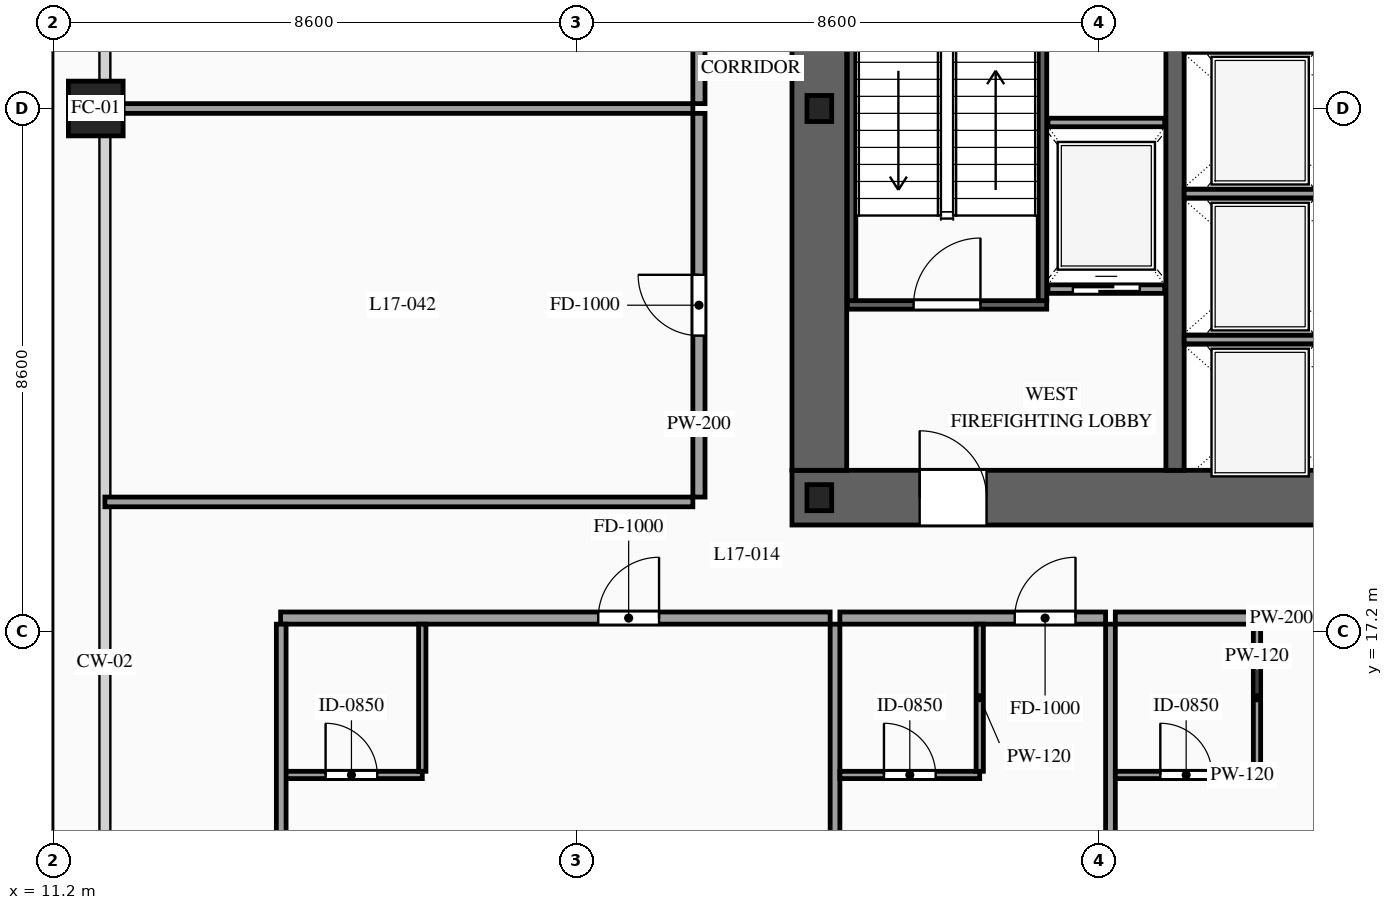
"""IFC4 building model, lengths in metres.
Left out: names, types, materials, properties, quantities, classifications, styles, units other than length and angle.
Written with IfcOpenShell. Run it as: python <this file> out.ifc"""

import sys

from ifc_helpers import new_model, si_unit, direction, frame, frame_2d, origin, origin_2d, place, context, subcontext, project, spatial, rectangle, hollow_rectangle, i_section, extrude, source, transform, mapped, element, fill, save


model = new_model("IFC4")
c1 = context("Model", 3, precision=1e-05, world=origin(), true_north=direction((0.0, 1.0)))
c2 = subcontext(c1, "Body", "Model", "MODEL_VIEW")
j1 = project(units=[si_unit("LENGTHUNIT", "METRE"), si_unit("PLANEANGLEUNIT", "RADIAN")], contexts=[c1])
p1 = place(None, origin())
s1 = spatial("IfcSite", under=j1, at=p1, CompositionType="ELEMENT")
p2 = place(p1, origin())
s2 = spatial("IfcBuilding", under=s1, at=p2, CompositionType="ELEMENT")
p3 = place(p2, frame((0.0, 0.0, 67.6)))
s3 = spatial("IfcBuildingStorey", under=s2, at=p3, CompositionType="ELEMENT", Elevation=67.6)
p4 = place(p3, frame((23.35, 19.4, 0.0), z_axis=(0.0, 0.0, 1.0), x_axis=(1.0, 0.0, 0.0)))
e1 = element("IfcWall", 1, at=p4, inside=s3, PredefinedType="SHEAR", context=c2, shape_type="SweptSolid", body=[
    extrude(rectangle(XDim=27.3, YDim=0.9, at=frame_2d((13.65, 0.0))), origin(), (0.0, 0.0, 1.0), 3.6),
])
p5 = place(p4, frame((2.1, 0.0, 0.0)))
e2 = element("IfcOpeningElement", 2, at=p5, cuts=e1, PredefinedType="OPENING", context=c2, shape_type="SweptSolid", body=[
    extrude(rectangle(XDim=1.1, YDim=2.2, at=frame_2d((0.55, 1.1))), frame((0.0, 0.465, 0.0), z_axis=(0.0, -1.0, 0.0), x_axis=(1.0, 0.0, 0.0)), (0.0, 0.0, 1.0), 0.93),
])
p6 = place(p4, frame((10.0, 0.0, 0.0)))
e3 = element("IfcOpeningElement", 3, at=p6, cuts=e1, PredefinedType="OPENING", context=c2, shape_type="SweptSolid", body=[
    extrude(rectangle(XDim=1.1, YDim=2.2, at=frame_2d((0.55, 1.1))), frame((0.0, 0.465, 0.0), z_axis=(0.0, -1.0, 0.0), x_axis=(1.0, 0.0, 0.0)), (0.0, 0.0, 1.0), 0.93),
])
p7 = place(p4, frame((23.2, 0.0, 0.0)))
e4 = element("IfcOpeningElement", 4, at=p7, cuts=e1, PredefinedType="OPENING", context=c2, shape_type="SweptSolid", body=[
    extrude(rectangle(XDim=1.1, YDim=2.2, at=frame_2d((0.55, 1.1))), frame((0.0, 0.465, 0.0), z_axis=(0.0, -1.0, 0.0), x_axis=(1.0, 0.0, 0.0)), (0.0, 0.0, 1.0), 0.93),
])
p8 = place(p4, frame((19.82, 0.0, 0.0)))
e5 = element("IfcOpeningElement", 5, at=p8, cuts=e1, PredefinedType="OPENING", context=c2, shape_type="SweptSolid", body=[
    extrude(rectangle(XDim=0.9, YDim=2.15, at=frame_2d((0.45, 1.075))), frame((0.0, 0.465, 0.0), z_axis=(0.0, -1.0, 0.0), x_axis=(1.0, 0.0, 0.0)), (0.0, 0.0, 1.0), 0.93),
])
p9 = place(p4, frame((18.38, 0.0, 0.0)))
e6 = element("IfcOpeningElement", 6, at=p9, cuts=e1, PredefinedType="OPENING", context=c2, shape_type="SweptSolid", body=[
    extrude(rectangle(XDim=0.9, YDim=2.15, at=frame_2d((0.45, 1.075))), frame((0.0, 0.465, 0.0), z_axis=(0.0, -1.0, 0.0), x_axis=(1.0, 0.0, 0.0)), (0.0, 0.0, 1.0), 0.93),
])
m1 = source(origin(), c2, "Body", "SweptSolid", [
    extrude(rectangle(XDim=11.9, YDim=0.9, at=frame_2d((5.95, 0.0))), origin(), (0.0, 0.0, 1.0), 3.6),
])
p10 = place(p3, frame((23.8, 19.85, 0.0), z_axis=(0.0, 0.0, 1.0), x_axis=(0.0, 1.0, 0.0)))
e7 = element("IfcWall", 7, at=p10, inside=s3, PredefinedType="SHEAR", context=c2, shape_type="MappedRepresentation", body=[
    mapped(m1, transform((0.0, 0.0, 0.0), scale=1.0)),
])
m2 = source(origin(), c2, "Body", "SweptSolid", [
    extrude(rectangle(XDim=11.9, YDim=0.3, at=frame_2d((5.95, 0.0))), origin(), (0.0, 0.0, 1.0), 3.6),
])
p11 = place(p3, frame((29.65, 19.85, 0.0), z_axis=(0.0, 0.0, 1.0), x_axis=(0.0, 1.0, 0.0)))
e8 = element("IfcWall", 8, at=p11, inside=s3, PredefinedType="SOLIDWALL", context=c2, shape_type="MappedRepresentation", body=[
    mapped(m2, transform((0.0, 0.0, 0.0), scale=1.0)),
])
m3 = source(origin(), c2, "Body", "SweptSolid", [
    extrude(i_section(OverallWidth=0.407, OverallDepth=0.428, WebThickness=0.02, FlangeThickness=0.035, at=origin_2d()), origin(), (0.0, 0.0, 1.0), 3.6),
])
for number, where, z_axis, x_axis in (
    (9, (23.8, 19.4, 0.0), (0.0, 0.0, 1.0), (1.0, 0.0, 0.0)),
    (10, (23.8, 25.8, 0.0), (0.0, 0.0, 1.0), (1.0, 0.0, 0.0)),
):
    element("IfcColumn", number, at=place(p3, frame(where, z_axis=z_axis, x_axis=x_axis)), inside=s3, PredefinedType="COLUMN", context=c2, shape_type="MappedRepresentation", body=[
        mapped(m3, transform((0.0, 0.0, 0.0), scale=1.0)),
    ])
m4 = source(origin(), c2, "Body", "SweptSolid", [
    extrude(hollow_rectangle(XDim=0.9, YDim=0.9, WallThickness=0.042, at=origin_2d()), origin(), (0.0, 0.0, 1.0), 3.6),
])
p12 = place(p3, frame((11.9, 25.8, 0.0), z_axis=(0.0, 0.0, 1.0), x_axis=(1.0, 0.0, 0.0)))
e11 = element("IfcColumn", 11, at=p12, inside=s3, PredefinedType="COLUMN", context=c2, shape_type="MappedRepresentation", body=[
    mapped(m4, transform((0.0, 0.0, 0.0), scale=1.0)),
])
p13 = place(p3, frame((27.56, 22.83, 0.0), z_axis=(0.0, 0.0, 1.0), x_axis=(1.0, 0.0, 0.0)))
e12 = element("IfcWall", 12, at=p13, inside=s3, PredefinedType="SOLIDWALL", context=c2, shape_type="SweptSolid", body=[
    extrude(rectangle(XDim=1.92, YDim=0.14, at=frame_2d((0.96, 0.0))), origin(), (0.0, 0.0, 1.0), 3.38),
])
p14 = place(p13, frame((0.41, 0.0, 0.0)))
e13 = element("IfcOpeningElement", 13, at=p14, cuts=e12, PredefinedType="OPENING", context=c2, shape_type="SweptSolid", body=[
    extrude(rectangle(XDim=1.1, YDim=2.2, at=frame_2d((0.55, 1.1))), frame((0.0, 0.085, 0.0), z_axis=(0.0, -1.0, 0.0), x_axis=(1.0, 0.0, 0.0)), (0.0, 0.0, 1.0), 0.17),
])
m5 = source(origin(), c2, "Body", "SweptSolid", [
    extrude(rectangle(XDim=1.92, YDim=0.14, at=frame_2d((0.96, 0.0))), origin(), (0.0, 0.0, 1.0), 3.38),
])
p15 = place(p3, frame((27.56, 25.57, 0.0), z_axis=(0.0, 0.0, 1.0), x_axis=(1.0, 0.0, 0.0)))
e14 = element("IfcWall", 14, at=p15, inside=s3, PredefinedType="SOLIDWALL", context=c2, shape_type="MappedRepresentation", body=[
    mapped(m5, transform((0.0, 0.0, 0.0), scale=1.0)),
])
m6 = source(origin(), c2, "Body", "SweptSolid", [
    extrude(rectangle(XDim=2.5, YDim=0.14, at=frame_2d((1.25, 0.0))), origin(), (0.0, 0.0, 1.0), 3.38),
])
for number, where, z_axis, x_axis in (
    (15, (29.8, 22.0, 0.0), (0.0, 0.0, 1.0), (1.0, 0.0, 0.0)),
    (16, (29.8, 24.4, 0.0), (0.0, 0.0, 1.0), (1.0, 0.0, 0.0)),
):
    element("IfcWall", number, at=place(p3, frame(where, z_axis=z_axis, x_axis=x_axis)), inside=s3, PredefinedType="SOLIDWALL", context=c2, shape_type="MappedRepresentation", body=[
        mapped(m6, transform((0.0, 0.0, 0.0), scale=1.0)),
    ])
p16 = place(p3, frame((24.26, 22.57, 0.0), z_axis=(0.0, 0.0, 1.0), x_axis=(1.0, 0.0, 0.0)))
e17 = element("IfcWall", 17, at=p16, inside=s3, PredefinedType="SOLIDWALL", context=c2, shape_type="SweptSolid", body=[
    extrude(rectangle(XDim=3.28, YDim=0.14, at=frame_2d((1.64, 0.0))), origin(), (0.0, 0.0, 1.0), 3.38),
])
p17 = place(p16, frame((1.09, 0.0, 0.0)))
e18 = element("IfcOpeningElement", 18, at=p17, cuts=e17, PredefinedType="OPENING", context=c2, shape_type="SweptSolid", body=[
    extrude(rectangle(XDim=1.1, YDim=2.2, at=frame_2d((0.55, 1.1))), frame((0.0, 0.085, 0.0), z_axis=(0.0, -1.0, 0.0), x_axis=(1.0, 0.0, 0.0)), (0.0, 0.0, 1.0), 0.17),
])
m7 = source(origin(), c2, "Body", "SweptSolid", [
    extrude(rectangle(XDim=8.94, YDim=0.14, at=frame_2d((4.47, 0.0))), origin(), (0.0, 0.0, 1.0), 3.38),
])
for number, where, z_axis, x_axis in (
    (19, (24.33, 22.64, 0.0), (0.0, 0.0, 1.0), (0.0, 1.0, 0.0)),
    (20, (27.47, 22.64, 0.0), (0.0, 0.0, 1.0), (0.0, 1.0, 0.0)),
):
    element("IfcWall", number, at=place(p3, frame(where, z_axis=z_axis, x_axis=x_axis)), inside=s3, PredefinedType="SOLIDWALL", context=c2, shape_type="MappedRepresentation", body=[
        mapped(m7, transform((0.0, 0.0, 0.0), scale=1.0)),
    ])
p18 = place(p3, frame((14.94, 17.42, 0.0), z_axis=(0.0, 0.0, 1.0), x_axis=(1.0, 0.0, 0.0)))
e21 = element("IfcWall", 21, at=p18, inside=s3, PredefinedType="PARTITIONING", context=c2, shape_type="SweptSolid", body=[
    extrude(rectangle(XDim=9.038, YDim=0.2, at=frame_2d((4.519, 0.0))), origin(), (0.0, 0.0, 1.0), 3.38),
])
p19 = place(p18, frame((5.224, 0.0, 0.0)))
e22 = element("IfcOpeningElement", 22, at=p19, cuts=e21, PredefinedType="OPENING", context=c2, shape_type="SweptSolid", body=[
    extrude(rectangle(XDim=1.0, YDim=2.2, at=frame_2d((0.5, 1.1))), frame((0.0, 0.115, 0.0), z_axis=(0.0, -1.0, 0.0), x_axis=(1.0, 0.0, 0.0)), (0.0, 0.0, 1.0), 0.23),
])
m8 = source(origin(), c2, "Body", "SweptSolid", [
    extrude(rectangle(XDim=16.47, YDim=0.16, at=frame_2d((8.235, 0.0))), origin(), (0.0, 0.0, 1.0), 3.38),
])
p20 = place(p3, frame((24.058, 0.85, 0.0), z_axis=(0.0, 0.0, 1.0), x_axis=(0.0, 1.0, 0.0)))
e23 = element("IfcWall", 23, at=p20, inside=s3, PredefinedType="PARTITIONING", context=c2, shape_type="MappedRepresentation", body=[
    mapped(m8, transform((0.0, 0.0, 0.0), scale=1.0)),
])
p21 = place(p3, frame((14.94, 14.84, 0.0), z_axis=(0.0, 0.0, 1.0), x_axis=(1.0, 0.0, 0.0)))
e24 = element("IfcWall", 24, at=p21, inside=s3, PredefinedType="PARTITIONING", context=c2, shape_type="SweptSolid", body=[
    extrude(rectangle(XDim=2.33, YDim=0.12, at=frame_2d((1.165, 0.0))), origin(), (0.0, 0.0, 1.0), 3.38),
])
p22 = place(p21, frame((0.74, 0.0, 0.0)))
e25 = element("IfcOpeningElement", 25, at=p22, cuts=e24, PredefinedType="OPENING", context=c2, shape_type="SweptSolid", body=[
    extrude(rectangle(XDim=0.85, YDim=2.1, at=frame_2d((0.425, 1.05))), frame((0.0, 0.075, 0.0), z_axis=(0.0, -1.0, 0.0), x_axis=(1.0, 0.0, 0.0)), (0.0, 0.0, 1.0), 0.15),
])
m9 = source(origin(), c2, "Body", "SweptSolid", [
    extrude(rectangle(XDim=2.42, YDim=0.12, at=frame_2d((1.21, 0.0))), origin(), (0.0, 0.0, 1.0), 3.38),
])
p23 = place(p3, frame((17.27, 14.9, 0.0), z_axis=(0.0, 0.0, 1.0), x_axis=(0.0, 1.0, 0.0)))
e26 = element("IfcWall", 26, at=p23, inside=s3, PredefinedType="PARTITIONING", context=c2, shape_type="MappedRepresentation", body=[
    mapped(m9, transform((0.0, 0.0, 0.0), scale=1.0)),
])
p24 = place(p3, frame((24.138, 17.42, 0.0), z_axis=(0.0, 0.0, 1.0), x_axis=(1.0, 0.0, 0.0)))
e27 = element("IfcWall", 27, at=p24, inside=s3, PredefinedType="PARTITIONING", context=c2, shape_type="SweptSolid", body=[
    extrude(rectangle(XDim=4.37, YDim=0.2, at=frame_2d((2.185, 0.0))), origin(), (0.0, 0.0, 1.0), 3.38),
])
p25 = place(p24, frame((2.875, 0.0, 0.0)))
e28 = element("IfcOpeningElement", 28, at=p25, cuts=e27, PredefinedType="OPENING", context=c2, shape_type="SweptSolid", body=[
    extrude(rectangle(XDim=1.0, YDim=2.2, at=frame_2d((0.5, 1.1))), frame((0.0, 0.115, 0.0), z_axis=(0.0, -1.0, 0.0), x_axis=(1.0, 0.0, 0.0)), (0.0, 0.0, 1.0), 0.23),
])
p26 = place(p3, frame((28.588, 0.85, 0.0), z_axis=(0.0, 0.0, 1.0), x_axis=(0.0, 1.0, 0.0)))
e29 = element("IfcWall", 29, at=p26, inside=s3, PredefinedType="PARTITIONING", context=c2, shape_type="MappedRepresentation", body=[
    mapped(m8, transform((0.0, 0.0, 0.0), scale=1.0)),
])
p27 = place(p3, frame((24.138, 14.84, 0.0), z_axis=(0.0, 0.0, 1.0), x_axis=(1.0, 0.0, 0.0)))
e30 = element("IfcWall", 30, at=p27, inside=s3, PredefinedType="PARTITIONING", context=c2, shape_type="SweptSolid", body=[
    extrude(rectangle(XDim=2.3, YDim=0.12, at=frame_2d((1.15, 0.0))), origin(), (0.0, 0.0, 1.0), 3.38),
])
p28 = place(p27, frame((0.725, 0.0, 0.0)))
e31 = element("IfcOpeningElement", 31, at=p28, cuts=e30, PredefinedType="OPENING", context=c2, shape_type="SweptSolid", body=[
    extrude(rectangle(XDim=0.85, YDim=2.1, at=frame_2d((0.425, 1.05))), frame((0.0, 0.075, 0.0), z_axis=(0.0, -1.0, 0.0), x_axis=(1.0, 0.0, 0.0)), (0.0, 0.0, 1.0), 0.15),
])
p29 = place(p3, frame((26.438, 14.9, 0.0), z_axis=(0.0, 0.0, 1.0), x_axis=(0.0, 1.0, 0.0)))
e32 = element("IfcWall", 32, at=p29, inside=s3, PredefinedType="PARTITIONING", context=c2, shape_type="MappedRepresentation", body=[
    mapped(m9, transform((0.0, 0.0, 0.0), scale=1.0)),
])
p30 = place(p3, frame((28.668, 17.42, 0.0), z_axis=(0.0, 0.0, 1.0), x_axis=(1.0, 0.0, 0.0)))
e33 = element("IfcWall", 33, at=p30, inside=s3, PredefinedType="PARTITIONING", context=c2, shape_type="SweptSolid", body=[
    extrude(rectangle(XDim=10.017, YDim=0.2, at=frame_2d((5.009, 0.0))), origin(), (0.0, 0.0, 1.0), 3.38),
])
p31 = place(p30, frame((5.714, 0.0, 0.0)))
e34 = element("IfcOpeningElement", 34, at=p31, cuts=e33, PredefinedType="OPENING", context=c2, shape_type="SweptSolid", body=[
    extrude(rectangle(XDim=1.0, YDim=2.2, at=frame_2d((0.5, 1.1))), frame((0.0, 0.115, 0.0), z_axis=(0.0, -1.0, 0.0), x_axis=(1.0, 0.0, 0.0)), (0.0, 0.0, 1.0), 0.23),
])
p32 = place(p3, frame((28.668, 14.84, 0.0), z_axis=(0.0, 0.0, 1.0), x_axis=(1.0, 0.0, 0.0)))
e35 = element("IfcWall", 35, at=p32, inside=s3, PredefinedType="PARTITIONING", context=c2, shape_type="SweptSolid", body=[
    extrude(rectangle(XDim=2.33, YDim=0.12, at=frame_2d((1.165, 0.0))), origin(), (0.0, 0.0, 1.0), 3.38),
])
p33 = place(p32, frame((0.74, 0.0, 0.0)))
e36 = element("IfcOpeningElement", 36, at=p33, cuts=e35, PredefinedType="OPENING", context=c2, shape_type="SweptSolid", body=[
    extrude(rectangle(XDim=0.85, YDim=2.1, at=frame_2d((0.425, 1.05))), frame((0.0, 0.075, 0.0), z_axis=(0.0, -1.0, 0.0), x_axis=(1.0, 0.0, 0.0)), (0.0, 0.0, 1.0), 0.15),
])
p34 = place(p3, frame((30.998, 14.9, 0.0), z_axis=(0.0, 0.0, 1.0), x_axis=(0.0, 1.0, 0.0)))
e37 = element("IfcWall", 37, at=p34, inside=s3, PredefinedType="PARTITIONING", context=c2, shape_type="MappedRepresentation", body=[
    mapped(m9, transform((0.0, 0.0, 0.0), scale=1.0)),
])
m10 = source(origin(), c2, "Body", "SweptSolid", [
    extrude(rectangle(XDim=16.32, YDim=0.16, at=frame_2d((8.16, 0.0))), origin(), (0.0, 0.0, 1.0), 3.38),
])
p35 = place(p3, frame((14.95, 1.0, 0.0), z_axis=(0.0, 0.0, 1.0), x_axis=(0.0, 1.0, 0.0)))
e38 = element("IfcWall", 38, at=p35, inside=s3, PredefinedType="PARTITIONING", context=c2, shape_type="MappedRepresentation", body=[
    mapped(m10, transform((0.0, 0.0, 0.0), scale=1.0)),
])
p36 = place(p3, frame((21.82, 19.41, 0.0), z_axis=(0.0, 0.0, 1.0), x_axis=(0.0, 1.0, 0.0)))
e39 = element("IfcWall", 39, at=p36, inside=s3, PredefinedType="PARTITIONING", context=c2, shape_type="SweptSolid", body=[
    extrude(rectangle(XDim=6.31, YDim=0.2, at=frame_2d((3.155, 0.0))), origin(), (0.0, 0.0, 1.0), 3.38),
])
p37 = place(p36, frame((2.655, 0.0, 0.0)))
e40 = element("IfcOpeningElement", 40, at=p37, cuts=e39, PredefinedType="OPENING", context=c2, shape_type="SweptSolid", body=[
    extrude(rectangle(XDim=1.0, YDim=2.2, at=frame_2d((0.5, 1.1))), frame((0.0, 0.115, 0.0), z_axis=(0.0, -1.0, 0.0), x_axis=(1.0, 0.0, 0.0)), (0.0, 0.0, 1.0), 0.23),
])
m11 = source(origin(), c2, "Body", "SweptSolid", [
    extrude(rectangle(XDim=9.67, YDim=0.16, at=frame_2d((4.835, 0.0))), origin(), (0.0, 0.0, 1.0), 2.575),
])
p38 = place(p3, frame((12.05, 25.8, 0.0), z_axis=(0.0, 0.0, 1.0), x_axis=(1.0, 0.0, 0.0)))
e41 = element("IfcWall", 41, at=p38, inside=s3, PredefinedType="PARTITIONING", context=c2, shape_type="MappedRepresentation", body=[
    mapped(m11, transform((0.0, 0.0, 0.0), scale=1.0)),
])
m12 = source(origin(), c2, "Body", "SweptSolid", [
    extrude(rectangle(XDim=9.67, YDim=0.16, at=frame_2d((4.835, 0.0))), origin(), (0.0, 0.0, 1.0), 2.875),
])
p39 = place(p3, frame((12.05, 19.33, 0.0), z_axis=(0.0, 0.0, 1.0), x_axis=(1.0, 0.0, 0.0)))
e42 = element("IfcWall", 42, at=p39, inside=s3, PredefinedType="PARTITIONING", context=c2, shape_type="MappedRepresentation", body=[
    mapped(m12, transform((0.0, 0.0, 0.0), scale=1.0)),
])
p40 = place(p3, frame((21.82, 25.88, 0.0), z_axis=(0.0, 0.0, 1.0), x_axis=(0.0, 1.0, 0.0)))
e43 = element("IfcWall", 43, at=p40, inside=s3, PredefinedType="PARTITIONING", context=c2, shape_type="SweptSolid", body=[
    extrude(rectangle(XDim=6.31, YDim=0.2, at=frame_2d((3.155, 0.0))), origin(), (0.0, 0.0, 1.0), 3.38),
])
p41 = place(p40, frame((2.655, 0.0, 0.0)))
e44 = element("IfcOpeningElement", 44, at=p41, cuts=e43, PredefinedType="OPENING", context=c2, shape_type="SweptSolid", body=[
    extrude(rectangle(XDim=1.0, YDim=2.2, at=frame_2d((0.5, 1.1))), frame((0.0, 0.115, 0.0), z_axis=(0.0, -1.0, 0.0), x_axis=(1.0, 0.0, 0.0)), (0.0, 0.0, 1.0), 0.23),
])
m13 = source(origin(), c2, "Body", "SweptSolid", [
    extrude(rectangle(XDim=1.1, YDim=2.2, at=frame_2d((0.55, 1.1))), frame((0.0, 0.025, 0.0), z_axis=(0.0, -1.0, 0.0), x_axis=(1.0, 0.0, 0.0)), (0.0, 0.0, 1.0), 0.05),
])
p42 = place(p14, origin())
e45 = element("IfcDoor", 45, at=p42, inside=s3, OperationType="SLIDING_TO_LEFT", PredefinedType="DOOR", context=c2, shape_type="MappedRepresentation", body=[
    mapped(m13, transform((0.0, 0.0, 0.0), scale=1.0)),
])
fill(e13, e45)
m14 = source(origin(), c2, "Body", "SweptSolid", [
    extrude(rectangle(XDim=1.1, YDim=2.2, at=frame_2d((0.55, 1.1))), frame((0.0, 0.025, 0.0), z_axis=(0.0, -1.0, 0.0), x_axis=(1.0, 0.0, 0.0)), (0.0, 0.0, 1.0), 0.05),
])
p43 = place(p17, origin())
e46 = element("IfcDoor", 46, at=p43, inside=s3, OperationType="SINGLE_SWING_RIGHT", PredefinedType="DOOR", context=c2, shape_type="MappedRepresentation", body=[
    mapped(m14, transform((0.0, 0.0, 0.0), scale=1.0)),
])
fill(e18, e46)
p44 = place(p5, origin())
e47 = element("IfcDoor", 47, at=p44, inside=s3, OperationType="SINGLE_SWING_LEFT", PredefinedType="DOOR", context=c2, shape_type="MappedRepresentation", body=[
    mapped(m14, transform((0.0, 0.0, 0.0), scale=1.0)),
])
fill(e2, e47)
m15 = source(origin(), c2, "Body", "SweptSolid", [
    extrude(rectangle(XDim=1.0, YDim=2.2, at=frame_2d((0.5, 1.1))), frame((0.0, 0.025, 0.0), z_axis=(0.0, -1.0, 0.0), x_axis=(1.0, 0.0, 0.0)), (0.0, 0.0, 1.0), 0.05),
])
p45 = place(p19, origin())
e48 = element("IfcDoor", 48, at=p45, inside=s3, OperationType="SINGLE_SWING_RIGHT", PredefinedType="DOOR", context=c2, shape_type="MappedRepresentation", body=[
    mapped(m15, transform((0.0, 0.0, 0.0), scale=1.0)),
])
fill(e22, e48)
m16 = source(origin(), c2, "Body", "SweptSolid", [
    extrude(rectangle(XDim=0.85, YDim=2.1, at=frame_2d((0.425, 1.05))), frame((0.0, 0.025, 0.0), z_axis=(0.0, -1.0, 0.0), x_axis=(1.0, 0.0, 0.0)), (0.0, 0.0, 1.0), 0.05),
])
p46 = place(p22, origin())
e49 = element("IfcDoor", 49, at=p46, inside=s3, OperationType="SINGLE_SWING_LEFT", PredefinedType="DOOR", context=c2, shape_type="MappedRepresentation", body=[
    mapped(m16, transform((0.0, 0.0, 0.0), scale=1.0)),
])
fill(e25, e49)
p47 = place(p25, origin())
e50 = element("IfcDoor", 50, at=p47, inside=s3, OperationType="SINGLE_SWING_RIGHT", PredefinedType="DOOR", context=c2, shape_type="MappedRepresentation", body=[
    mapped(m15, transform((0.0, 0.0, 0.0), scale=1.0)),
])
fill(e28, e50)
p48 = place(p28, origin())
e51 = element("IfcDoor", 51, at=p48, inside=s3, OperationType="SINGLE_SWING_LEFT", PredefinedType="DOOR", context=c2, shape_type="MappedRepresentation", body=[
    mapped(m16, transform((0.0, 0.0, 0.0), scale=1.0)),
])
fill(e31, e51)
p49 = place(p33, origin())
e52 = element("IfcDoor", 52, at=p49, inside=s3, OperationType="SINGLE_SWING_LEFT", PredefinedType="DOOR", context=c2, shape_type="MappedRepresentation", body=[
    mapped(m16, transform((0.0, 0.0, 0.0), scale=1.0)),
])
fill(e36, e52)
p50 = place(p37, origin())
e53 = element("IfcDoor", 53, at=p50, inside=s3, OperationType="SINGLE_SWING_RIGHT", PredefinedType="DOOR", context=c2, shape_type="MappedRepresentation", body=[
    mapped(m15, transform((0.0, 0.0, 0.0), scale=1.0)),
])
fill(e40, e53)
save(model, sys.argv[1])
